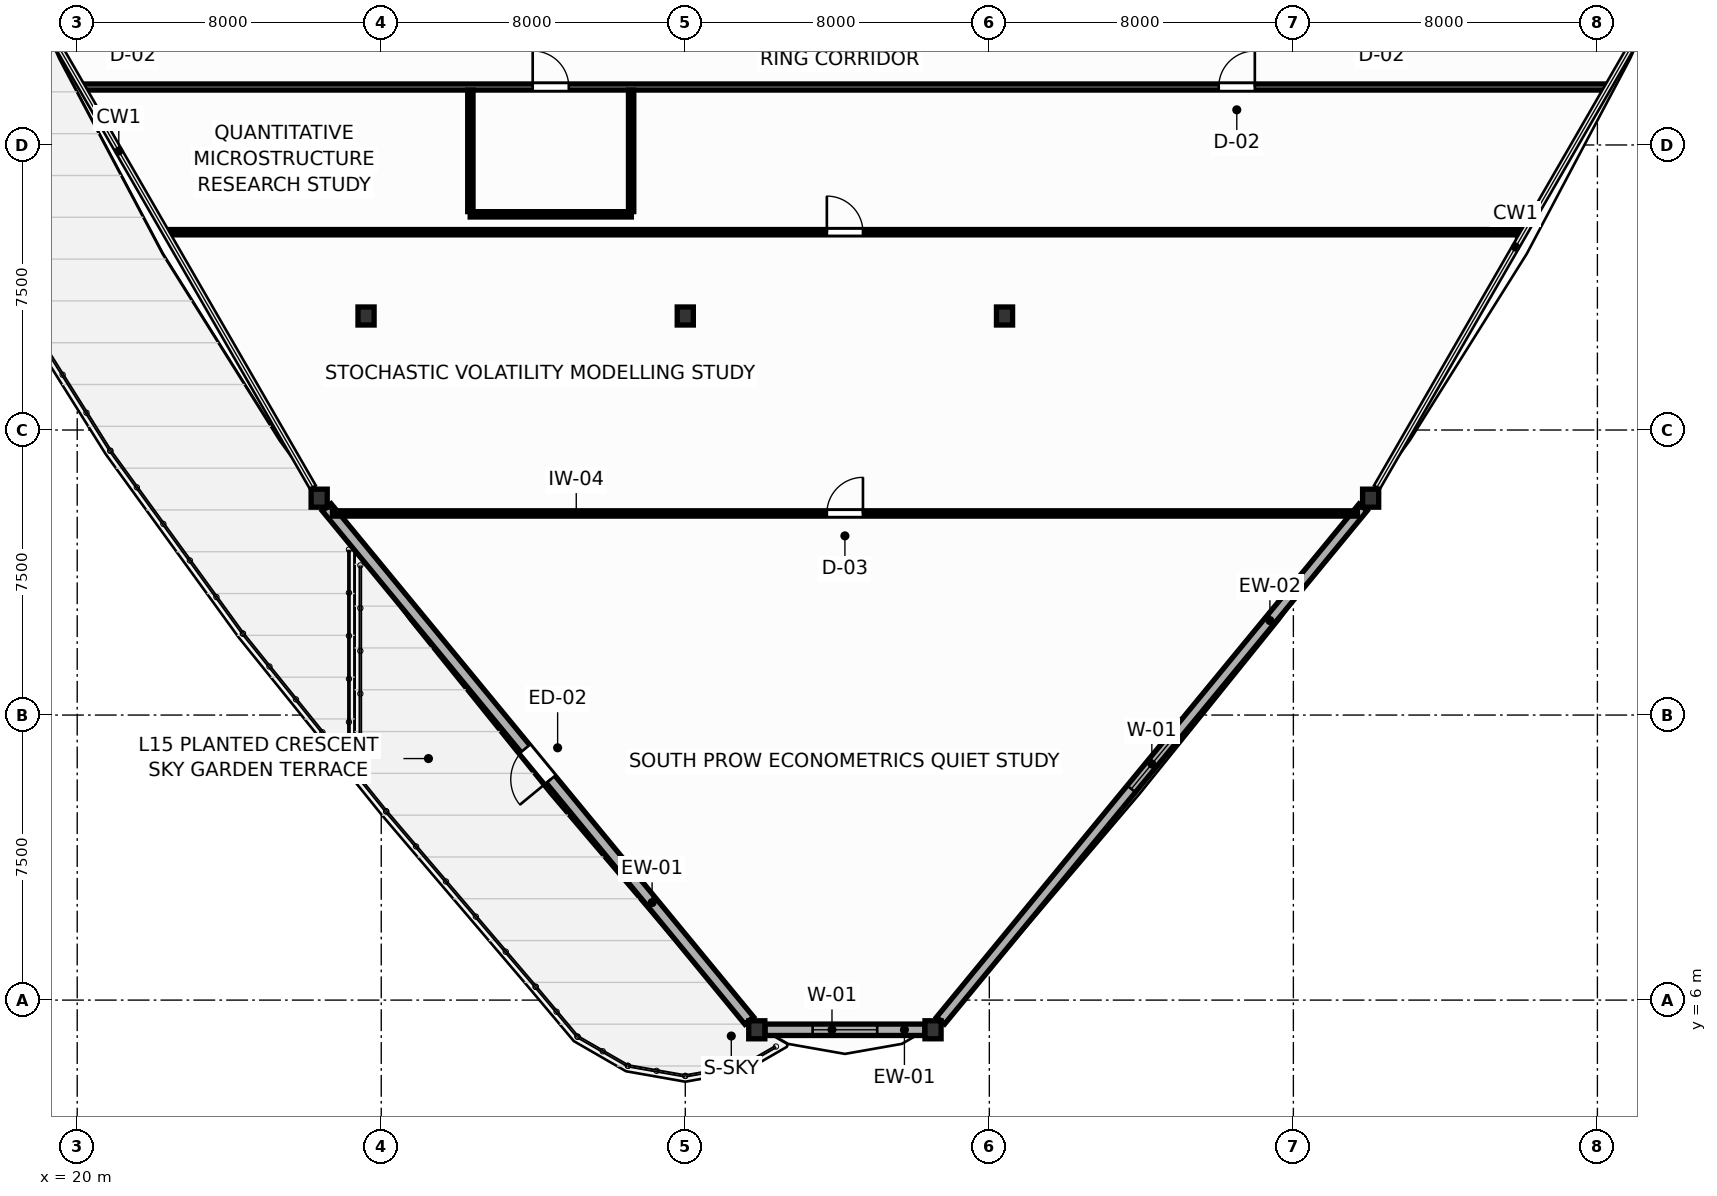
"""IFC4 building model, lengths in metres.
Left out: names, types, materials, properties, quantities, classifications, styles, units other than length and angle.
Written with IfcOpenShell. Run it as: python <this file> out.ifc"""

import sys

from ifc_helpers import new_model, si_unit, direction, frame, frame_2d, origin, origin_2d, place, context, subcontext, project, spatial, rectangle, i_section, extrude, source, transform, mapped, element, fill, save


model = new_model("IFC4")
c1 = context("Model", 3, precision=1e-05, world=origin(), true_north=direction((0.0, 1.0)))
c2 = subcontext(c1, "Body", "Model", "MODEL_VIEW")
j1 = project(units=[si_unit("LENGTHUNIT", "METRE"), si_unit("PLANEANGLEUNIT", "RADIAN")], contexts=[c1])
p1 = place(None, origin())
s1 = spatial("IfcSite", under=j1, at=p1, CompositionType="ELEMENT")
p2 = place(p1, origin())
s2 = spatial("IfcBuilding", under=s1, at=p2, CompositionType="ELEMENT")
p3 = place(p2, frame((0.0, 0.0, 63.9)))
s3 = spatial("IfcBuildingStorey", under=s2, at=p3, CompositionType="ELEMENT", Elevation=63.9)
m1 = source(origin(), c2, "Body", "SweptSolid", [
    extrude(i_section(OverallWidth=0.424, OverallDepth=0.474, WebThickness=0.045, FlangeThickness=0.072, FilletRadius=0.015, at=origin_2d()), origin(), (0.0, 0.0, 1.0), 3.9),
])
for number, where, z_axis, x_axis in (
    (1, (27.6, 24.0, 0.0), (0.0, 0.0, 1.0), (1.0, 0.0, 0.0)),
    (2, (44.4, 24.0, 0.0), (0.0, 0.0, 1.0), (1.0, 0.0, 0.0)),
    (3, (36.0, 24.0, 0.0), (0.0, 0.0, 1.0), (1.0, 0.0, 0.0)),
    (4, (26.367, 19.207, 0.0), (0.0, 0.0, 1.0), (1.0, 0.0, 0.0)),
    (5, (37.881, 5.219, 0.0), (0.0, 0.0, 1.0), (1.0, 0.0, 0.0)),
    (6, (42.519, 5.219, 0.0), (0.0, 0.0, 1.0), (1.0, 0.0, 0.0)),
    (7, (54.033, 19.207, 0.0), (0.0, 0.0, 1.0), (1.0, 0.0, 0.0)),
):
    element("IfcColumn", number, at=place(p3, frame(where, z_axis=z_axis, x_axis=x_axis)), inside=s3, PredefinedType="COLUMN", context=c2, shape_type="MappedRepresentation", body=[
        mapped(m1, transform((0.0, 0.0, 0.0), scale=1.0)),
    ])
p4 = place(p3, frame((26.566, 18.965, 0.0), z_axis=(0.0, 0.0, 1.0), x_axis=(0.635547248194, -0.772061976342, 0.0)))
e8 = element("IfcWall", 8, at=p4, inside=s3, PredefinedType="SOLIDWALL", context=c2, shape_type="SweptSolid", body=[
    extrude(rectangle(XDim=17.49, YDim=0.3, at=frame_2d((8.745, 0.0))), origin(), (0.0, 0.0, 1.0), 3.23),
])
p5 = place(p4, frame((8.22, 0.0, 0.0)))
e9 = element("IfcOpeningElement", 9, at=p5, cuts=e8, PredefinedType="OPENING", context=c2, shape_type="SweptSolid", body=[
    extrude(rectangle(XDim=1.05, YDim=2.1, at=frame_2d((0.525, 1.05))), frame((0.0, 0.16, 0.0), z_axis=(0.0, -1.0, 0.0), x_axis=(1.0, 0.0, 0.0)), (0.0, 0.0, 1.0), 0.32),
])
p6 = place(p3, frame((38.098, 5.219, 0.0), z_axis=(0.0, 0.0, 1.0), x_axis=(1.0, 0.0, 0.0)))
e10 = element("IfcWall", 10, at=p6, inside=s3, PredefinedType="SOLIDWALL", context=c2, shape_type="SweptSolid", body=[
    extrude(rectangle(XDim=4.204, YDim=0.3, at=frame_2d((2.102, 0.0))), origin(), (0.0, 0.0, 1.0), 3.23),
])
p7 = place(p6, frame((1.252, 0.0, 0.75)))
e11 = element("IfcOpeningElement", 11, at=p7, cuts=e10, PredefinedType="OPENING", context=c2, shape_type="SweptSolid", body=[
    extrude(rectangle(XDim=1.7, YDim=1.75, at=frame_2d((0.85, 0.875))), frame((0.0, 0.16, 0.0), z_axis=(0.0, -1.0, 0.0), x_axis=(1.0, 0.0, 0.0)), (0.0, 0.0, 1.0), 0.32),
])
p8 = place(p3, frame((42.718, 5.461, 0.0), z_axis=(0.0, 0.0, 1.0), x_axis=(0.635547248194, 0.772061976342, 0.0)))
e12 = element("IfcWall", 12, at=p8, inside=s3, PredefinedType="SOLIDWALL", context=c2, shape_type="SweptSolid", body=[
    extrude(rectangle(XDim=17.49, YDim=0.28, at=frame_2d((8.745, 0.0))), origin(), (0.0, 0.0, 1.0), 3.23),
])
p9 = place(p8, frame((7.895, 0.0, 0.75)))
e13 = element("IfcOpeningElement", 13, at=p9, cuts=e12, PredefinedType="OPENING", context=c2, shape_type="SweptSolid", body=[
    extrude(rectangle(XDim=1.7, YDim=1.75, at=frame_2d((0.85, 0.875))), frame((0.0, 0.15, 0.0), z_axis=(0.0, -1.0, 0.0), x_axis=(1.0, 0.0, 0.0)), (0.0, 0.0, 1.0), 0.3),
])
p10 = place(p3, frame((20.141, 30.025, 0.0), z_axis=(0.0, 0.0, 1.0), x_axis=(1.0, 0.0, 0.0)))
e14 = element("IfcWall", 14, at=p10, inside=s3, PredefinedType="PARTITIONING", context=c2, shape_type="SweptSolid", body=[
    extrude(rectangle(XDim=40.119, YDim=0.16, at=frame_2d((20.06, 0.0))), origin(), (0.0, 0.0, 1.0), 3.68),
])
p11 = place(p10, frame((11.844, 0.0, 0.0)))
e15 = element("IfcOpeningElement", 15, at=p11, cuts=e14, PredefinedType="OPENING", context=c2, shape_type="SweptSolid", body=[
    extrude(rectangle(XDim=0.95, YDim=2.05, at=frame_2d((0.475, 1.025))), frame((0.0, 0.09, 0.0), z_axis=(0.0, -1.0, 0.0), x_axis=(1.0, 0.0, 0.0)), (0.0, 0.0, 1.0), 0.18),
])
p12 = place(p10, frame((29.896, 0.0, 0.0)))
e16 = element("IfcOpeningElement", 16, at=p12, cuts=e14, PredefinedType="OPENING", context=c2, shape_type="SweptSolid", body=[
    extrude(rectangle(XDim=0.95, YDim=2.05, at=frame_2d((0.475, 1.025))), frame((0.0, 0.09, 0.0), z_axis=(0.0, -1.0, 0.0), x_axis=(1.0, 0.0, 0.0)), (0.0, 0.0, 1.0), 0.18),
])
p13 = place(p3, frame((22.346, 26.205, 0.0), z_axis=(0.0, 0.0, 1.0), x_axis=(1.0, 0.0, 0.0)))
e17 = element("IfcWall", 17, at=p13, inside=s3, PredefinedType="PARTITIONING", context=c2, shape_type="SweptSolid", body=[
    extrude(rectangle(XDim=35.708, YDim=0.14, at=frame_2d((17.854, 0.0))), origin(), (0.0, 0.0, 1.0), 3.68),
])
p14 = place(p13, frame((17.379, 0.0, 0.0)))
e18 = element("IfcOpeningElement", 18, at=p14, cuts=e17, PredefinedType="OPENING", context=c2, shape_type="SweptSolid", body=[
    extrude(rectangle(XDim=0.95, YDim=2.05, at=frame_2d((0.475, 1.025))), frame((0.0, 0.08, 0.0), z_axis=(0.0, -1.0, 0.0), x_axis=(1.0, 0.0, 0.0)), (0.0, 0.0, 1.0), 0.16),
])
p15 = place(p3, frame((26.717, 18.805, 0.0), z_axis=(0.0, 0.0, 1.0), x_axis=(1.0, 0.0, 0.0)))
e19 = element("IfcWall", 19, at=p15, inside=s3, PredefinedType="PARTITIONING", context=c2, shape_type="SweptSolid", body=[
    extrude(rectangle(XDim=26.965, YDim=0.14, at=frame_2d((13.483, 0.0))), origin(), (0.0, 0.0, 1.0), 3.68),
])
p16 = place(p15, frame((13.008, 0.0, 0.0)))
e20 = element("IfcOpeningElement", 20, at=p16, cuts=e19, PredefinedType="OPENING", context=c2, shape_type="SweptSolid", body=[
    extrude(rectangle(XDim=0.95, YDim=2.05, at=frame_2d((0.475, 1.025))), frame((0.0, 0.08, 0.0), z_axis=(0.0, -1.0, 0.0), x_axis=(1.0, 0.0, 0.0)), (0.0, 0.0, 1.0), 0.16),
])
p17 = place(p3, frame((30.34, 26.675, 0.0), z_axis=(0.0, 0.0, 1.0), x_axis=(1.0, 0.0, 0.0)))
e21 = element("IfcWall", 21, at=p17, inside=s3, PredefinedType="PARTITIONING", context=c2, shape_type="SweptSolid", body=[
    extrude(rectangle(XDim=4.24, YDim=0.14, at=frame_2d((2.12, 0.0))), origin(), (0.0, 0.0, 1.0), 3.68),
])
for number, where, z_axis, x_axis in (
    (22, (34.575, 26.747, 0.0), (0.0, 0.0, 1.0), (0.0, 1.0, 0.0)),
    (23, (30.345, 26.747, 0.0), (0.0, 0.0, 1.0), (0.0, 1.0, 0.0)),
):
    element("IfcWall", number, at=place(p3, frame(where, z_axis=z_axis, x_axis=x_axis)), inside=s3, PredefinedType="PARTITIONING", context=c2, shape_type="SweptSolid", body=[
        extrude(rectangle(XDim=3.196, YDim=0.14, at=frame_2d((1.598, 0.0))), origin(), (0.0, 0.0, 1.0), 3.68),
    ])
p18 = place(p5, frame((1.05, 0.0, 0.0), z_axis=(0.0, 0.0, 1.0), x_axis=(-1.0, 0.0, 0.0)))
e24 = element("IfcDoor", 24, at=p18, inside=s3, OperationType="SINGLE_SWING_LEFT", PredefinedType="DOOR", context=c2, shape_type="SweptSolid", body=[
    extrude(rectangle(XDim=1.05, YDim=2.1, at=frame_2d((0.525, 1.05))), frame((0.0, 0.025, 0.0), z_axis=(0.0, -1.0, 0.0), x_axis=(1.0, 0.0, 0.0)), (0.0, 0.0, 1.0), 0.05),
])
fill(e9, e24)
p19 = place(p7, origin())
e25 = element("IfcWindow", 25, at=p19, inside=s3, PartitioningType="SINGLE_PANEL", PredefinedType="WINDOW", context=c2, shape_type="SweptSolid", body=[
    extrude(rectangle(XDim=1.7, YDim=1.75, at=frame_2d((0.85, 0.875))), frame((0.0, 0.03, 0.0), z_axis=(0.0, -1.0, 0.0), x_axis=(1.0, 0.0, 0.0)), (0.0, 0.0, 1.0), 0.06),
])
fill(e11, e25)
p20 = place(p9, origin())
e26 = element("IfcWindow", 26, at=p20, inside=s3, PartitioningType="SINGLE_PANEL", PredefinedType="WINDOW", context=c2, shape_type="SweptSolid", body=[
    extrude(rectangle(XDim=1.7, YDim=1.75, at=frame_2d((0.85, 0.875))), frame((0.0, 0.03, 0.0), z_axis=(0.0, -1.0, 0.0), x_axis=(1.0, 0.0, 0.0)), (0.0, 0.0, 1.0), 0.06),
])
fill(e13, e26)
p21 = place(p11, origin())
e27 = element("IfcDoor", 27, at=p21, inside=s3, OperationType="SINGLE_SWING_LEFT", PredefinedType="DOOR", context=c2, shape_type="SweptSolid", body=[
    extrude(rectangle(XDim=0.95, YDim=2.05, at=frame_2d((0.475, 1.025))), frame((0.0, 0.025, 0.0), z_axis=(0.0, -1.0, 0.0), x_axis=(1.0, 0.0, 0.0)), (0.0, 0.0, 1.0), 0.05),
])
fill(e15, e27)
p22 = place(p12, origin())
e28 = element("IfcDoor", 28, at=p22, inside=s3, OperationType="SINGLE_SWING_RIGHT", PredefinedType="DOOR", context=c2, shape_type="SweptSolid", body=[
    extrude(rectangle(XDim=0.95, YDim=2.05, at=frame_2d((0.475, 1.025))), frame((0.0, 0.025, 0.0), z_axis=(0.0, -1.0, 0.0), x_axis=(1.0, 0.0, 0.0)), (0.0, 0.0, 1.0), 0.05),
])
fill(e16, e28)
p23 = place(p14, origin())
e29 = element("IfcDoor", 29, at=p23, inside=s3, OperationType="SINGLE_SWING_LEFT", PredefinedType="DOOR", context=c2, shape_type="SweptSolid", body=[
    extrude(rectangle(XDim=0.95, YDim=2.05, at=frame_2d((0.475, 1.025))), frame((0.0, 0.025, 0.0), z_axis=(0.0, -1.0, 0.0), x_axis=(1.0, 0.0, 0.0)), (0.0, 0.0, 1.0), 0.05),
])
fill(e18, e29)
p24 = place(p16, origin())
e30 = element("IfcDoor", 30, at=p24, inside=s3, OperationType="SINGLE_SWING_RIGHT", PredefinedType="DOOR", context=c2, shape_type="SweptSolid", body=[
    extrude(rectangle(XDim=0.95, YDim=2.05, at=frame_2d((0.475, 1.025))), frame((0.0, 0.025, 0.0), z_axis=(0.0, -1.0, 0.0), x_axis=(1.0, 0.0, 0.0)), (0.0, 0.0, 1.0), 0.05),
])
fill(e20, e30)
save(model, sys.argv[1])
